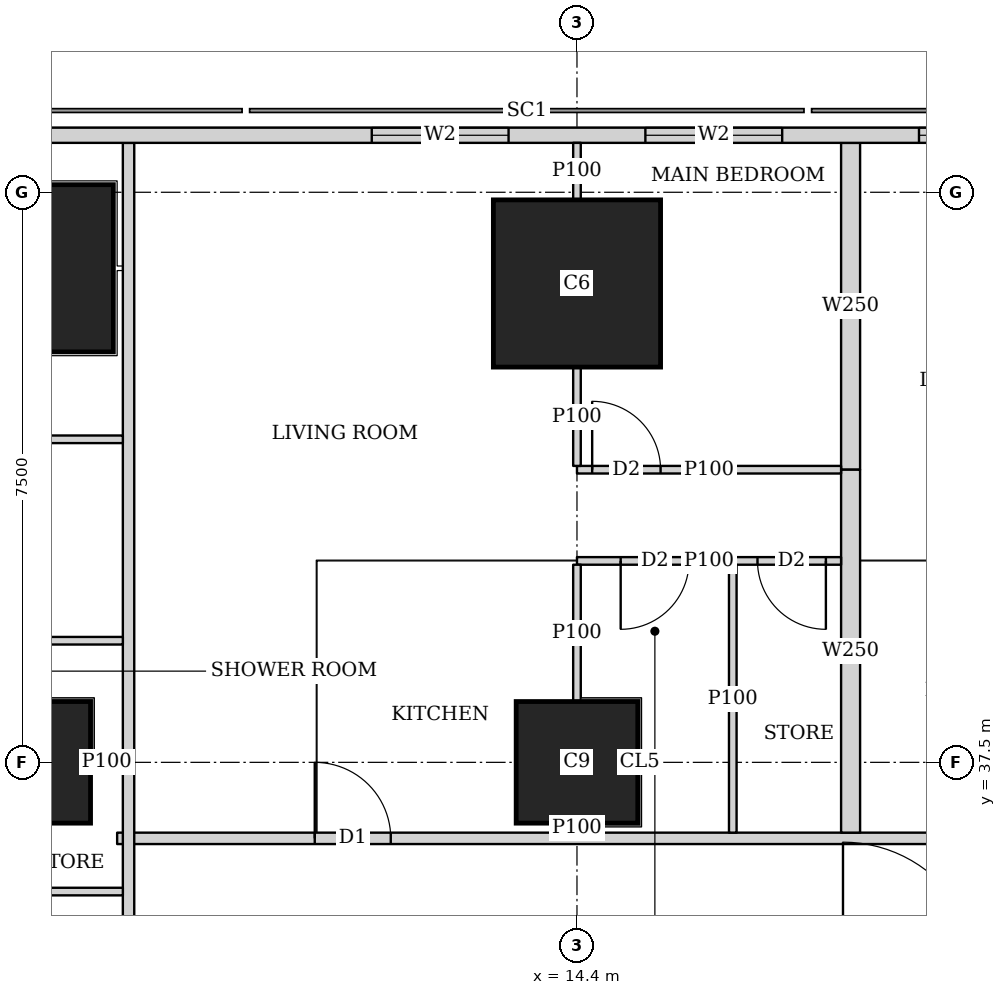
"""IFC4 building model, lengths in metres.
Left out: names, types, materials, properties, quantities, classifications, styles, units other than length and angle.
Written with IfcOpenShell. Run it as: python <this file> out.ifc"""

import sys

from ifc_helpers import new_model, si_unit, direction, frame, frame_2d, origin, origin_2d, place, context, subcontext, project, spatial, rectangle, extrude, element, fill, save


model = new_model("IFC4")
c1 = context("Model", 3, precision=1e-05, world=origin(), true_north=direction((0.0, 1.0)))
c2 = subcontext(c1, "Body", "Model", "MODEL_VIEW")
j1 = project(units=[si_unit("LENGTHUNIT", "METRE"), si_unit("PLANEANGLEUNIT", "RADIAN")], contexts=[c1])
p1 = place(None, origin())
s1 = spatial("IfcSite", under=j1, at=p1, CompositionType="ELEMENT")
p2 = place(p1, origin())
s2 = spatial("IfcBuilding", under=s1, at=p2, CompositionType="ELEMENT")
p3 = place(p2, frame((0.0, 0.0, 89.15)))
s3 = spatial("IfcBuildingStorey", under=s2, at=p3, CompositionType="ELEMENT", Elevation=89.15)
for number, where, z_axis, x_axis in (
    (1, (7.2, 37.5, 0.0), (0.0, 0.0, 1.0), (1.0, 0.0, 0.0)),
    (2, (14.4, 37.5, 0.0), (0.0, 0.0, 1.0), (1.0, 0.0, 0.0)),
):
    element("IfcColumn", number, at=place(p3, frame(where, z_axis=z_axis, x_axis=x_axis)), inside=s3, PredefinedType="COLUMN", context=c2, shape_type="SweptSolid", body=[
        extrude(rectangle(XDim=1.6, YDim=1.6, at=origin_2d()), origin(), (0.0, 0.0, 1.0), 3.75),
    ])
for number, where, z_axis, x_axis in (
    (3, (7.2, 44.0, 0.0), (0.0, 0.0, 1.0), (1.0, 0.0, 0.0)),
    (4, (14.4, 43.8, 0.0), (0.0, 0.0, 1.0), (1.0, 0.0, 0.0)),
):
    element("IfcColumn", number, at=place(p3, frame(where, z_axis=z_axis, x_axis=x_axis)), inside=s3, PredefinedType="COLUMN", context=c2, shape_type="SweptSolid", body=[
        extrude(rectangle(XDim=2.2, YDim=2.2, at=origin_2d()), origin(), (0.0, 0.0, 1.0), 3.75),
    ])
p4 = place(p3, frame((40.106, 45.75, 0.0), z_axis=(0.0, 0.0, 1.0), x_axis=(-1.0, 0.0, 0.0)))
e5 = element("IfcWall", 5, at=p4, inside=s3, PredefinedType="SOLIDWALL", context=c2, shape_type="SweptSolid", body=[
    extrude(rectangle(XDim=37.943, YDim=0.2, at=frame_2d((18.971, 0.0))), origin(), (0.0, 0.0, 1.0), 3.5),
])
p5 = place(p4, frame((8.606, 0.0, 0.9)))
e6 = element("IfcOpeningElement", 6, at=p5, cuts=e5, PredefinedType="OPENING", context=c2, shape_type="SweptSolid", body=[
    extrude(rectangle(XDim=1.8, YDim=1.5, at=frame_2d((0.9, 0.75))), frame((0.0, 0.11, 0.0), z_axis=(0.0, -1.0, 0.0), x_axis=(1.0, 0.0, 0.0)), (0.0, 0.0, 1.0), 0.22),
])
p6 = place(p4, frame((12.206, 0.0, 0.9)))
e7 = element("IfcOpeningElement", 7, at=p6, cuts=e5, PredefinedType="OPENING", context=c2, shape_type="SweptSolid", body=[
    extrude(rectangle(XDim=1.8, YDim=1.5, at=frame_2d((0.9, 0.75))), frame((0.0, 0.11, 0.0), z_axis=(0.0, -1.0, 0.0), x_axis=(1.0, 0.0, 0.0)), (0.0, 0.0, 1.0), 0.22),
])
p7 = place(p4, frame((15.806, 0.0, 0.9)))
e8 = element("IfcOpeningElement", 8, at=p7, cuts=e5, PredefinedType="OPENING", context=c2, shape_type="SweptSolid", body=[
    extrude(rectangle(XDim=1.8, YDim=1.5, at=frame_2d((0.9, 0.75))), frame((0.0, 0.11, 0.0), z_axis=(0.0, -1.0, 0.0), x_axis=(1.0, 0.0, 0.0)), (0.0, 0.0, 1.0), 0.22),
])
p8 = place(p4, frame((19.406, 0.0, 0.9)))
e9 = element("IfcOpeningElement", 9, at=p8, cuts=e5, PredefinedType="OPENING", context=c2, shape_type="SweptSolid", body=[
    extrude(rectangle(XDim=1.8, YDim=1.5, at=frame_2d((0.9, 0.75))), frame((0.0, 0.11, 0.0), z_axis=(0.0, -1.0, 0.0), x_axis=(1.0, 0.0, 0.0)), (0.0, 0.0, 1.0), 0.22),
])
p9 = place(p4, frame((23.006, 0.0, 0.9)))
e10 = element("IfcOpeningElement", 10, at=p9, cuts=e5, PredefinedType="OPENING", context=c2, shape_type="SweptSolid", body=[
    extrude(rectangle(XDim=1.8, YDim=1.5, at=frame_2d((0.9, 0.75))), frame((0.0, 0.11, 0.0), z_axis=(0.0, -1.0, 0.0), x_axis=(1.0, 0.0, 0.0)), (0.0, 0.0, 1.0), 0.22),
])
p10 = place(p4, frame((26.606, 0.0, 0.9)))
e11 = element("IfcOpeningElement", 11, at=p10, cuts=e5, PredefinedType="OPENING", context=c2, shape_type="SweptSolid", body=[
    extrude(rectangle(XDim=1.8, YDim=1.5, at=frame_2d((0.9, 0.75))), frame((0.0, 0.11, 0.0), z_axis=(0.0, -1.0, 0.0), x_axis=(1.0, 0.0, 0.0)), (0.0, 0.0, 1.0), 0.22),
])
p11 = place(p3, frame((8.5, -0.65, 0.0), z_axis=(0.0, 0.0, 1.0), x_axis=(0.0, 1.0, 0.0)))
e12 = element("IfcWall", 12, at=p11, inside=s3, PredefinedType="SOLIDWALL", context=c2, shape_type="SweptSolid", body=[
    extrude(rectangle(XDim=46.3, YDim=0.15, at=frame_2d((23.15, 0.0))), origin(), (0.0, 0.0, 1.0), 2.2),
])
p12 = place(p11, frame((9.525, 0.0, 0.0)))
e13 = element("IfcOpeningElement", 13, at=p12, cuts=e12, PredefinedType="OPENING", context=c2, shape_type="SweptSolid", body=[
    extrude(rectangle(XDim=1.0, YDim=2.1, at=frame_2d((0.5, 1.05))), frame((0.0, 0.085, 0.0), z_axis=(0.0, -1.0, 0.0), x_axis=(1.0, 0.0, 0.0)), (0.0, 0.0, 1.0), 0.17),
])
p13 = place(p11, frame((13.275, 0.0, 0.0)))
e14 = element("IfcOpeningElement", 14, at=p13, cuts=e12, PredefinedType="OPENING", context=c2, shape_type="SweptSolid", body=[
    extrude(rectangle(XDim=1.0, YDim=2.1, at=frame_2d((0.5, 1.05))), frame((0.0, 0.085, 0.0), z_axis=(0.0, -1.0, 0.0), x_axis=(1.0, 0.0, 0.0)), (0.0, 0.0, 1.0), 0.17),
])
p14 = place(p11, frame((20.775, 0.0, 0.0)))
e15 = element("IfcOpeningElement", 15, at=p14, cuts=e12, PredefinedType="OPENING", context=c2, shape_type="SweptSolid", body=[
    extrude(rectangle(XDim=1.0, YDim=2.1, at=frame_2d((0.5, 1.05))), frame((0.0, 0.085, 0.0), z_axis=(0.0, -1.0, 0.0), x_axis=(1.0, 0.0, 0.0)), (0.0, 0.0, 1.0), 0.17),
])
p15 = place(p11, frame((32.025, 0.0, 0.0)))
e16 = element("IfcOpeningElement", 16, at=p15, cuts=e12, PredefinedType="OPENING", context=c2, shape_type="SweptSolid", body=[
    extrude(rectangle(XDim=1.0, YDim=2.1, at=frame_2d((0.5, 1.05))), frame((0.0, 0.085, 0.0), z_axis=(0.0, -1.0, 0.0), x_axis=(1.0, 0.0, 0.0)), (0.0, 0.0, 1.0), 0.17),
])
p16 = place(p3, frame((8.35, 36.5, 0.0), z_axis=(0.0, 0.0, 1.0), x_axis=(1.0, 0.0, 0.0)))
e17 = element("IfcWall", 17, at=p16, inside=s3, PredefinedType="SOLIDWALL", context=c2, shape_type="SweptSolid", body=[
    extrude(rectangle(XDim=26.415, YDim=0.15, at=frame_2d((13.208, 0.0))), origin(), (0.0, 0.0, 1.0), 3.5),
])
p17 = place(p16, frame((2.6, 0.0, 0.0)))
e18 = element("IfcOpeningElement", 18, at=p17, cuts=e17, PredefinedType="OPENING", context=c2, shape_type="SweptSolid", body=[
    extrude(rectangle(XDim=1.0, YDim=2.1, at=frame_2d((0.5, 1.05))), frame((0.0, 0.085, 0.0), z_axis=(0.0, -1.0, 0.0), x_axis=(1.0, 0.0, 0.0)), (0.0, 0.0, 1.0), 0.17),
])
p18 = place(p16, frame((10.75, 0.0, 0.0)))
e19 = element("IfcOpeningElement", 19, at=p18, cuts=e17, PredefinedType="OPENING", context=c2, shape_type="SweptSolid", body=[
    extrude(rectangle(XDim=1.0, YDim=2.1, at=frame_2d((0.5, 1.05))), frame((0.0, 0.085, 0.0), z_axis=(0.0, -1.0, 0.0), x_axis=(1.0, 0.0, 0.0)), (0.0, 0.0, 1.0), 0.17),
])
p19 = place(p16, frame((18.007, 0.0, 0.0)))
e20 = element("IfcOpeningElement", 20, at=p19, cuts=e17, PredefinedType="OPENING", context=c2, shape_type="SweptSolid", body=[
    extrude(rectangle(XDim=1.0, YDim=2.1, at=frame_2d((0.5, 1.05))), frame((0.0, 0.085, 0.0), z_axis=(0.0, -1.0, 0.0), x_axis=(1.0, 0.0, 0.0)), (0.0, 0.0, 1.0), 0.17),
])
p20 = place(p3, frame((8.001, 37.5, 0.0), z_axis=(0.0, 0.0, 1.0), x_axis=(1.0, 0.0, 0.0)))
e21 = element("IfcWall", 21, at=p20, inside=s3, PredefinedType="PARTITIONING", context=c2, shape_type="SweptSolid", body=[
    extrude(rectangle(XDim=0.424, YDim=0.1, at=frame_2d((0.212, 0.0))), origin(), (0.0, 0.0, 1.0), 3.5),
])
for number, where, z_axis, x_axis in (
    (22, (4.9, 35.8, 0.0), (0.0, 0.0, 1.0), (1.0, 0.0, 0.0)),
    (23, (4.9, 39.1, 0.0), (0.0, 0.0, 1.0), (1.0, 0.0, 0.0)),
):
    element("IfcWall", number, at=place(p3, frame(where, z_axis=z_axis, x_axis=x_axis)), inside=s3, PredefinedType="PARTITIONING", context=c2, shape_type="SweptSolid", body=[
        extrude(rectangle(XDim=3.525, YDim=0.1, at=frame_2d((1.763, 0.0))), origin(), (0.0, 0.0, 1.0), 3.5),
    ])
p21 = place(p3, frame((14.4, 41.35, 0.0), z_axis=(0.0, 0.0, 1.0), x_axis=(1.0, 0.0, 0.0)))
e24 = element("IfcWall", 24, at=p21, inside=s3, PredefinedType="PARTITIONING", context=c2, shape_type="SweptSolid", body=[
    extrude(rectangle(XDim=3.475, YDim=0.1, at=frame_2d((1.738, 0.0))), origin(), (0.0, 0.0, 1.0), 3.5),
])
p22 = place(p21, frame((0.2, 0.0, 0.0)))
e25 = element("IfcOpeningElement", 25, at=p22, cuts=e24, PredefinedType="OPENING", context=c2, shape_type="SweptSolid", body=[
    extrude(rectangle(XDim=0.9, YDim=2.1, at=frame_2d((0.45, 1.05))), frame((0.0, 0.06, 0.0), z_axis=(0.0, -1.0, 0.0), x_axis=(1.0, 0.0, 0.0)), (0.0, 0.0, 1.0), 0.12),
])
p23 = place(p3, frame((14.4, 40.15, 0.0), z_axis=(0.0, 0.0, 1.0), x_axis=(1.0, 0.0, 0.0)))
e26 = element("IfcWall", 26, at=p23, inside=s3, PredefinedType="PARTITIONING", context=c2, shape_type="SweptSolid", body=[
    extrude(rectangle(XDim=3.475, YDim=0.1, at=frame_2d((1.738, 0.0))), origin(), (0.0, 0.0, 1.0), 3.5),
])
p24 = place(p23, frame((0.575, 0.0, 0.0)))
e27 = element("IfcOpeningElement", 27, at=p24, cuts=e26, PredefinedType="OPENING", context=c2, shape_type="SweptSolid", body=[
    extrude(rectangle(XDim=0.9, YDim=2.1, at=frame_2d((0.45, 1.05))), frame((0.0, 0.06, 0.0), z_axis=(0.0, -1.0, 0.0), x_axis=(1.0, 0.0, 0.0)), (0.0, 0.0, 1.0), 0.12),
])
p25 = place(p23, frame((2.375, 0.0, 0.0)))
e28 = element("IfcOpeningElement", 28, at=p25, cuts=e26, PredefinedType="OPENING", context=c2, shape_type="SweptSolid", body=[
    extrude(rectangle(XDim=0.9, YDim=2.1, at=frame_2d((0.45, 1.05))), frame((0.0, 0.06, 0.0), z_axis=(0.0, -1.0, 0.0), x_axis=(1.0, 0.0, 0.0)), (0.0, 0.0, 1.0), 0.12),
])
p26 = place(p3, frame((14.4, 41.4, 0.0), z_axis=(0.0, 0.0, 1.0), x_axis=(0.0, 1.0, 0.0)))
e29 = element("IfcWall", 29, at=p26, inside=s3, PredefinedType="PARTITIONING", context=c2, shape_type="SweptSolid", body=[
    extrude(rectangle(XDim=1.299, YDim=0.1, at=frame_2d((0.649, 0.0))), origin(), (0.0, 0.0, 1.0), 3.5),
])
p27 = place(p3, frame((14.4, 44.901, 0.0), z_axis=(0.0, 0.0, 1.0), x_axis=(0.0, 1.0, 0.0)))
e30 = element("IfcWall", 30, at=p27, inside=s3, PredefinedType="PARTITIONING", context=c2, shape_type="SweptSolid", body=[
    extrude(rectangle(XDim=0.749, YDim=0.1, at=frame_2d((0.375, 0.0))), origin(), (0.0, 0.0, 1.0), 3.5),
])
p28 = place(p3, frame((14.4, 36.575, 0.0), z_axis=(0.0, 0.0, 1.0), x_axis=(0.0, 1.0, 0.0)))
e31 = element("IfcWall", 31, at=p28, inside=s3, PredefinedType="PARTITIONING", context=c2, shape_type="SweptSolid", body=[
    extrude(rectangle(XDim=0.124, YDim=0.1, at=frame_2d((0.062, 0.0))), origin(), (0.0, 0.0, 1.0), 3.5),
])
p29 = place(p3, frame((14.4, 38.301, 0.0), z_axis=(0.0, 0.0, 1.0), x_axis=(0.0, 1.0, 0.0)))
e32 = element("IfcWall", 32, at=p29, inside=s3, PredefinedType="PARTITIONING", context=c2, shape_type="SweptSolid", body=[
    extrude(rectangle(XDim=1.799, YDim=0.1, at=frame_2d((0.899, 0.0))), origin(), (0.0, 0.0, 1.0), 3.5),
])
p30 = place(p3, frame((16.45, 36.575, 0.0), z_axis=(0.0, 0.0, 1.0), x_axis=(0.0, 1.0, 0.0)))
e33 = element("IfcWall", 33, at=p30, inside=s3, PredefinedType="PARTITIONING", context=c2, shape_type="SweptSolid", body=[
    extrude(rectangle(XDim=3.525, YDim=0.1, at=frame_2d((1.763, 0.0))), origin(), (0.0, 0.0, 1.0), 3.5),
])
p31 = place(p3, frame((18.0, 41.35, 0.0), z_axis=(0.0, 0.0, 1.0), x_axis=(0.0, 1.0, 0.0)))
e34 = element("IfcWall", 34, at=p31, inside=s3, PredefinedType="SOLIDWALL", context=c2, shape_type="SweptSolid", body=[
    extrude(rectangle(XDim=4.3, YDim=0.25, at=frame_2d((2.15, 0.0))), origin(), (0.0, 0.0, 1.0), 2.2),
])
p32 = place(p3, frame((18.0, 36.575, 0.0), z_axis=(0.0, 0.0, 1.0), x_axis=(0.0, 1.0, 0.0)))
e35 = element("IfcWall", 35, at=p32, inside=s3, PredefinedType="SOLIDWALL", context=c2, shape_type="SweptSolid", body=[
    extrude(rectangle(XDim=4.775, YDim=0.25, at=frame_2d((2.388, 0.0))), origin(), (0.0, 0.0, 1.0), 3.5),
])
p33 = place(p3, frame((8.425, 41.75, 0.0), z_axis=(0.0, 0.0, 1.0), x_axis=(-1.0, 0.0, 0.0)))
e36 = element("IfcWall", 36, at=p33, inside=s3, PredefinedType="PARTITIONING", context=c2, shape_type="SweptSolid", body=[
    extrude(rectangle(XDim=3.525, YDim=0.1, at=frame_2d((1.763, 0.0))), origin(), (0.0, 0.0, 1.0), 3.5),
])
p34 = place(p33, frame((2.35, 0.0, 0.0)))
e37 = element("IfcOpeningElement", 37, at=p34, cuts=e36, PredefinedType="OPENING", context=c2, shape_type="SweptSolid", body=[
    extrude(rectangle(XDim=0.9, YDim=2.1, at=frame_2d((0.45, 1.05))), frame((0.0, 0.06, 0.0), z_axis=(0.0, -1.0, 0.0), x_axis=(1.0, 0.0, 0.0)), (0.0, 0.0, 1.0), 0.12),
])
p35 = place(p8, origin())
e38 = element("IfcWindow", 38, at=p35, inside=s3, PartitioningType="SINGLE_PANEL", PredefinedType="WINDOW", context=c2, shape_type="SweptSolid", body=[
    extrude(rectangle(XDim=1.8, YDim=1.5, at=frame_2d((0.9, 0.75))), frame((0.0, 0.03, 0.0), z_axis=(0.0, -1.0, 0.0), x_axis=(1.0, 0.0, 0.0)), (0.0, 0.0, 1.0), 0.06),
])
fill(e9, e38)
p36 = place(p9, origin())
e39 = element("IfcWindow", 39, at=p36, inside=s3, PartitioningType="SINGLE_PANEL", PredefinedType="WINDOW", context=c2, shape_type="SweptSolid", body=[
    extrude(rectangle(XDim=1.8, YDim=1.5, at=frame_2d((0.9, 0.75))), frame((0.0, 0.03, 0.0), z_axis=(0.0, -1.0, 0.0), x_axis=(1.0, 0.0, 0.0)), (0.0, 0.0, 1.0), 0.06),
])
fill(e10, e39)
p37 = place(p10, origin())
e40 = element("IfcWindow", 40, at=p37, inside=s3, PartitioningType="SINGLE_PANEL", PredefinedType="WINDOW", context=c2, shape_type="SweptSolid", body=[
    extrude(rectangle(XDim=1.8, YDim=1.5, at=frame_2d((0.9, 0.75))), frame((0.0, 0.03, 0.0), z_axis=(0.0, -1.0, 0.0), x_axis=(1.0, 0.0, 0.0)), (0.0, 0.0, 1.0), 0.06),
])
fill(e11, e40)
p38 = place(p22, origin())
e41 = element("IfcDoor", 41, at=p38, inside=s3, OperationType="SINGLE_SWING_LEFT", PredefinedType="DOOR", context=c2, shape_type="SweptSolid", body=[
    extrude(rectangle(XDim=0.9, YDim=2.1, at=frame_2d((0.45, 1.05))), frame((0.0, 0.025, 0.0), z_axis=(0.0, -1.0, 0.0), x_axis=(1.0, 0.0, 0.0)), (0.0, 0.0, 1.0), 0.05),
])
fill(e25, e41)
p39 = place(p24, origin())
e42 = element("IfcDoor", 42, at=p39, inside=s3, OperationType="SINGLE_SWING_RIGHT", PredefinedType="DOOR", context=c2, shape_type="SweptSolid", body=[
    extrude(rectangle(XDim=0.9, YDim=2.1, at=frame_2d((0.45, 1.05))), frame((0.0, 0.025, 0.0), z_axis=(0.0, -1.0, 0.0), x_axis=(1.0, 0.0, 0.0)), (0.0, 0.0, 1.0), 0.05),
])
fill(e27, e42)
p40 = place(p25, origin())
e43 = element("IfcDoor", 43, at=p40, inside=s3, OperationType="SINGLE_SWING_LEFT", PredefinedType="DOOR", context=c2, shape_type="SweptSolid", body=[
    extrude(rectangle(XDim=0.9, YDim=2.1, at=frame_2d((0.45, 1.05))), frame((0.0, 0.025, 0.0), z_axis=(0.0, -1.0, 0.0), x_axis=(1.0, 0.0, 0.0)), (0.0, 0.0, 1.0), 0.05),
])
fill(e28, e43)
p41 = place(p17, origin())
e44 = element("IfcDoor", 44, at=p41, inside=s3, OperationType="SINGLE_SWING_LEFT", PredefinedType="DOOR", context=c2, shape_type="SweptSolid", body=[
    extrude(rectangle(XDim=1.0, YDim=2.1, at=frame_2d((0.5, 1.05))), frame((0.0, 0.025, 0.0), z_axis=(0.0, -1.0, 0.0), x_axis=(1.0, 0.0, 0.0)), (0.0, 0.0, 1.0), 0.05),
])
fill(e18, e44)
save(model, sys.argv[1])
